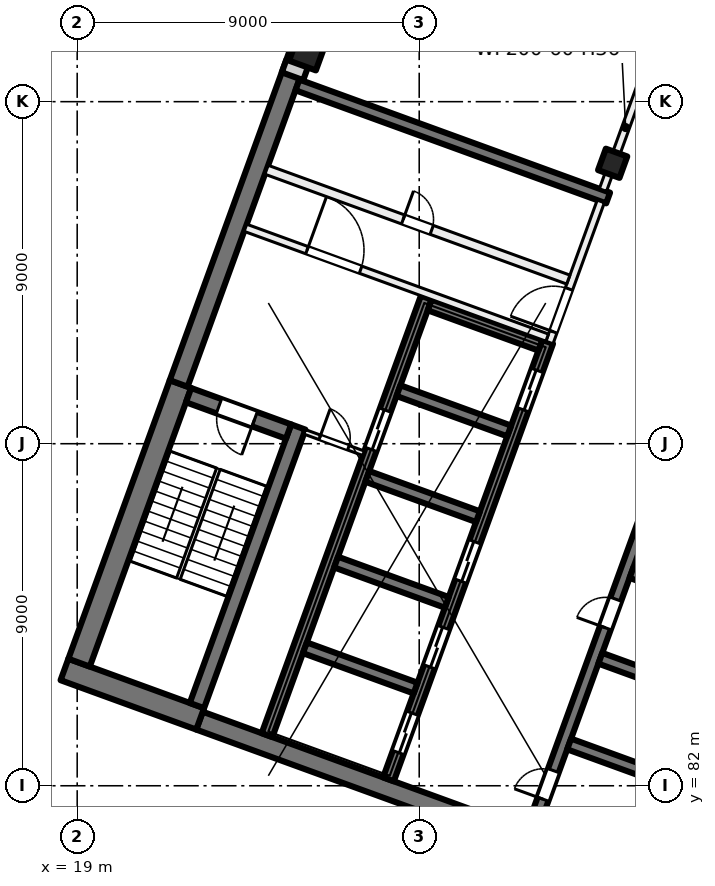
"""IFC4 building model, lengths in metres.
Left out: names, types, materials, properties, quantities, classifications, styles, units other than length and angle.
Written with IfcOpenShell. Run it as: python <this file> out.ifc"""

import sys

from ifc_helpers import new_model, si_unit, direction, frame, frame_2d, origin, origin_2d, place, context, subcontext, project, spatial, rectangle, extrude, element, fill, save


model = new_model("IFC4")
c1 = context("Model", 3, precision=1e-05, world=origin(), true_north=direction((0.0, 1.0)))
c2 = subcontext(c1, "Body", "Model", "MODEL_VIEW")
j1 = project(units=[si_unit("LENGTHUNIT", "METRE"), si_unit("PLANEANGLEUNIT", "RADIAN")], contexts=[c1])
p1 = place(None, origin())
s1 = spatial("IfcSite", under=j1, at=p1, CompositionType="ELEMENT")
p2 = place(p1, origin())
s2 = spatial("IfcBuilding", under=s1, at=p2, CompositionType="ELEMENT")
p3 = place(p2, frame((0.0, 0.0, 212.0)))
s3 = spatial("IfcBuildingStorey", under=s2, at=p3, CompositionType="ELEMENT", Elevation=212.0)
p4 = place(p3, frame((33.091, 98.379, 0.0), z_axis=(0.0, 0.0, 1.0), x_axis=(-0.342020143326, -0.939692620786, 0.0)))
e1 = element("IfcColumn", 1, at=p4, inside=s3, PredefinedType="COLUMN", context=c2, shape_type="SweptSolid", body=[
    extrude(rectangle(XDim=0.6, YDim=0.6, at=origin_2d()), origin(), (0.0, 0.0, 1.0), 4.0),
])
p5 = place(p3, frame((25.056, 101.303, 0.0), z_axis=(0.0, 0.0, 1.0), x_axis=(-0.342020143326, -0.939692620786, 0.0)))
e2 = element("IfcColumn", 2, at=p5, inside=s3, PredefinedType="COLUMN", context=c2, shape_type="SweptSolid", body=[
    extrude(rectangle(XDim=0.75, YDim=0.75, at=origin_2d()), origin(), (0.0, 0.0, 1.0), 4.0),
])
p6 = place(p3, frame((35.75, 78.788, 0.0), z_axis=(0.0, 0.0, 1.0), x_axis=(-0.939692894512, 0.342019391267, 0.0)))
e3 = element("IfcWall", 3, at=p6, inside=s3, PredefinedType="SHEAR", context=c2, shape_type="SweptSolid", body=[
    extrude(rectangle(XDim=14.4, YDim=0.5, at=frame_2d((7.2, 0.0))), origin(), (0.0, 0.0, 1.0), 4.0),
])
p7 = place(p3, frame((22.236, 83.76, 0.0), z_axis=(0.0, 0.0, 1.0), x_axis=(-0.939680822529, 0.342052557032, 0.0)))
e4 = element("IfcWall", 4, at=p7, inside=s3, PredefinedType="SHEAR", context=c2, shape_type="SweptSolid", body=[
    extrude(rectangle(XDim=3.8, YDim=0.6, at=frame_2d((1.9, 0.0))), origin(), (0.0, 0.0, 1.0), 4.0),
])
p8 = place(p3, frame((19.05, 85.239, 0.0), z_axis=(0.0, 0.0, 1.0), x_axis=(0.342016982193, 0.939693771338, 0.0)))
e5 = element("IfcWall", 5, at=p8, inside=s3, PredefinedType="SHEAR", context=c2, shape_type="SweptSolid", body=[
    extrude(rectangle(XDim=7.8, YDim=0.6, at=frame_2d((3.9, 0.0))), origin(), (0.0, 0.0, 1.0), 4.0),
])
p9 = place(p3, frame((21.67, 92.585, 0.0), z_axis=(0.0, 0.0, 1.0), x_axis=(0.342035714298, 0.93968695327, 0.0)))
e6 = element("IfcWall", 6, at=p9, inside=s3, PredefinedType="SHEAR", context=c2, shape_type="SweptSolid", body=[
    extrude(rectangle(XDim=8.975, YDim=0.5, at=frame_2d((4.488, 0.0))), origin(), (0.0, 0.0, 1.0), 4.0),
])
p10 = place(p3, frame((22.15, 84.11, 0.0), z_axis=(0.0, 0.0, 1.0), x_axis=(0.342016982193, 0.939693771338, 0.0)))
e7 = element("IfcWall", 7, at=p10, inside=s3, PredefinedType="SHEAR", context=c2, shape_type="SweptSolid", body=[
    extrude(rectangle(XDim=7.8, YDim=0.4, at=frame_2d((3.9, 0.0))), origin(), (0.0, 0.0, 1.0), 4.0),
])
p11 = place(p3, frame((24.562, 91.32, 0.0), z_axis=(0.0, 0.0, 1.0), x_axis=(-0.939717030584, 0.341953070509, 0.0)))
e8 = element("IfcWall", 8, at=p11, inside=s3, PredefinedType="SHEAR", context=c2, shape_type="SweptSolid", body=[
    extrude(rectangle(XDim=2.8, YDim=0.4, at=frame_2d((1.4, 0.0))), origin(), (0.0, 0.0, 1.0), 4.0),
])
p12 = place(p11, frame((0.95, 0.0, 0.0)))
e9 = element("IfcOpeningElement", 9, at=p12, cuts=e8, PredefinedType="OPENING", context=c2, shape_type="SweptSolid", body=[
    extrude(rectangle(XDim=1.0, YDim=2.1, at=frame_2d((0.5, 1.05))), frame((0.0, 0.21, 0.0), z_axis=(0.0, -1.0, 0.0), x_axis=(1.0, 0.0, 0.0)), (0.0, 0.0, 1.0), 0.42),
])
p13 = place(p3, frame((30.949, 80.801, 0.0), z_axis=(0.0, 0.0, 1.0), x_axis=(0.342016684409, 0.939693879721, 0.0)))
e10 = element("IfcWall", 10, at=p13, inside=s3, PredefinedType="SHEAR", context=c2, shape_type="SweptSolid", body=[
    extrude(rectangle(XDim=12.25, YDim=0.3, at=frame_2d((6.125, 0.0))), origin(), (0.0, 0.0, 1.0), 4.0),
])
p14 = place(p13, frame((0.9, 0.0, 0.0)))
e11 = element("IfcOpeningElement", 11, at=p14, cuts=e10, PredefinedType="OPENING", context=c2, shape_type="SweptSolid", body=[
    extrude(rectangle(XDim=0.8, YDim=2.1, at=frame_2d((0.4, 1.05))), frame((0.0, 0.16, 0.0), z_axis=(0.0, -1.0, 0.0), x_axis=(1.0, 0.0, 0.0)), (0.0, 0.0, 1.0), 0.32),
])
p15 = place(p13, frame((5.7, 0.0, 0.0)))
e12 = element("IfcOpeningElement", 12, at=p15, cuts=e10, PredefinedType="OPENING", context=c2, shape_type="SweptSolid", body=[
    extrude(rectangle(XDim=0.8, YDim=2.1, at=frame_2d((0.4, 1.05))), frame((0.0, 0.16, 0.0), z_axis=(0.0, -1.0, 0.0), x_axis=(1.0, 0.0, 0.0)), (0.0, 0.0, 1.0), 0.32),
])
p16 = place(p3, frame((34.858, 82.039, 0.0), z_axis=(0.0, 0.0, 1.0), x_axis=(-0.939689908313, 0.342027595692, 0.0)))
e13 = element("IfcWall", 13, at=p16, inside=s3, PredefinedType="SHEAR", context=c2, shape_type="SweptSolid", body=[
    extrude(rectangle(XDim=3.1, YDim=0.3, at=frame_2d((1.55, 0.0))), origin(), (0.0, 0.0, 1.0), 4.0),
])
p17 = place(p3, frame((35.679, 84.294, 0.0), z_axis=(0.0, 0.0, 1.0), x_axis=(-0.939706007505, 0.341983361377, 0.0)))
e14 = element("IfcWall", 14, at=p17, inside=s3, PredefinedType="SHEAR", context=c2, shape_type="SweptSolid", body=[
    extrude(rectangle(XDim=3.1, YDim=0.3, at=frame_2d((1.55, 0.0))), origin(), (0.0, 0.0, 1.0), 4.0),
])
p18 = place(p3, frame((36.5, 86.549, 0.0), z_axis=(0.0, 0.0, 1.0), x_axis=(-0.939689908313, 0.342027595692, 0.0)))
e15 = element("IfcWall", 15, at=p18, inside=s3, PredefinedType="SHEAR", context=c2, shape_type="SweptSolid", body=[
    extrude(rectangle(XDim=3.1, YDim=0.3, at=frame_2d((1.55, 0.0))), origin(), (0.0, 0.0, 1.0), 4.0),
])
p19 = place(p3, frame((27.191, 82.169, 0.0), z_axis=(0.0, 0.0, 1.0), x_axis=(0.342016684409, 0.939693879721, 0.0)))
e16 = element("IfcWall", 16, at=p19, inside=s3, PredefinedType="SHEAR", context=c2, shape_type="SweptSolid", body=[
    extrude(rectangle(XDim=12.25, YDim=0.3, at=frame_2d((6.125, 0.0))), origin(), (0.0, 0.0, 1.0), 4.0),
])
p20 = place(p19, frame((0.75, 0.0, 0.0)))
e17 = element("IfcOpeningElement", 17, at=p20, cuts=e16, PredefinedType="OPENING", context=c2, shape_type="SweptSolid", body=[
    extrude(rectangle(XDim=1.1, YDim=2.1, at=frame_2d((0.55, 1.05))), frame((0.0, 0.16, 0.0), z_axis=(0.0, -1.0, 0.0), x_axis=(1.0, 0.0, 0.0)), (0.0, 0.0, 1.0), 0.32),
])
p21 = place(p19, frame((3.15, 0.0, 0.0)))
e18 = element("IfcOpeningElement", 18, at=p21, cuts=e16, PredefinedType="OPENING", context=c2, shape_type="SweptSolid", body=[
    extrude(rectangle(XDim=1.1, YDim=2.1, at=frame_2d((0.55, 1.05))), frame((0.0, 0.16, 0.0), z_axis=(0.0, -1.0, 0.0), x_axis=(1.0, 0.0, 0.0)), (0.0, 0.0, 1.0), 0.32),
])
p22 = place(p19, frame((5.55, 0.0, 0.0)))
e19 = element("IfcOpeningElement", 19, at=p22, cuts=e16, PredefinedType="OPENING", context=c2, shape_type="SweptSolid", body=[
    extrude(rectangle(XDim=1.1, YDim=2.1, at=frame_2d((0.55, 1.05))), frame((0.0, 0.16, 0.0), z_axis=(0.0, -1.0, 0.0), x_axis=(1.0, 0.0, 0.0)), (0.0, 0.0, 1.0), 0.32),
])
p23 = place(p19, frame((10.35, 0.0, 0.0)))
e20 = element("IfcOpeningElement", 20, at=p23, cuts=e16, PredefinedType="OPENING", context=c2, shape_type="SweptSolid", body=[
    extrude(rectangle(XDim=1.1, YDim=2.1, at=frame_2d((0.55, 1.05))), frame((0.0, 0.16, 0.0), z_axis=(0.0, -1.0, 0.0), x_axis=(1.0, 0.0, 0.0)), (0.0, 0.0, 1.0), 0.32),
])
p24 = place(p3, frame((23.996, 83.332, 0.0), z_axis=(0.0, 0.0, 1.0), x_axis=(0.342016684409, 0.939693879721, 0.0)))
e21 = element("IfcWall", 21, at=p24, inside=s3, PredefinedType="SHEAR", context=c2, shape_type="SweptSolid", body=[
    extrude(rectangle(XDim=12.25, YDim=0.3, at=frame_2d((6.125, 0.0))), origin(), (0.0, 0.0, 1.0), 4.0),
])
p25 = place(p24, frame((8.0, 0.0, 0.0)))
e22 = element("IfcOpeningElement", 22, at=p25, cuts=e21, PredefinedType="OPENING", context=c2, shape_type="SweptSolid", body=[
    extrude(rectangle(XDim=1.1, YDim=2.1, at=frame_2d((0.55, 1.05))), frame((0.0, 0.16, 0.0), z_axis=(0.0, -1.0, 0.0), x_axis=(1.0, 0.0, 0.0)), (0.0, 0.0, 1.0), 0.32),
])
for number, where, z_axis, x_axis in (
    (23, (27.905, 84.57, 0.0), (0.0, 0.0, 1.0), (-0.94, 0.342, 0.0)),
    (24, (28.726, 86.825, 0.0), (0.0, 0.0, 1.0), (-0.94, 0.342, 0.0)),
    (25, (29.546, 89.08, 0.0), (0.0, 0.0, 1.0), (-0.94, 0.342, 0.0)),
):
    element("IfcWall", number, at=place(p3, frame(where, z_axis=z_axis, x_axis=x_axis)), inside=s3, PredefinedType="SHEAR", context=c2, shape_type="SweptSolid", body=[
        extrude(rectangle(XDim=3.1, YDim=0.3, at=frame_2d((1.55, 0.0))), origin(), (0.0, 0.0, 1.0), 4.0),
    ])
for number, where, z_axis, x_axis in (
    (26, (30.367, 91.336, 0.0), (0.0, 0.0, 1.0), (-0.94, 0.342, 0.0)),
    (27, (31.188, 93.591, 0.0), (0.0, 0.0, 1.0), (-0.94, 0.342, 0.0)),
):
    element("IfcWall", number, at=place(p3, frame(where, z_axis=z_axis, x_axis=x_axis)), inside=s3, PredefinedType="SHEAR", context=c2, shape_type="SweptSolid", body=[
        extrude(rectangle(XDim=3.1, YDim=0.3, at=frame_2d((1.55, 0.0))), origin(), (0.0, 0.0, 1.0), 4.0),
    ])
p26 = place(p3, frame((32.971, 97.465, 0.0), z_axis=(0.0, 0.0, 1.0), x_axis=(-0.939695066972, 0.34201342241, 0.0)))
e28 = element("IfcWall", 28, at=p26, inside=s3, PredefinedType="SHEAR", context=c2, shape_type="SweptSolid", body=[
    extrude(rectangle(XDim=8.7, YDim=0.3, at=frame_2d((4.35, 0.0))), origin(), (0.0, 0.0, 1.0), 4.0),
])
p27 = place(p3, frame((24.666, 100.669, 0.0), z_axis=(0.0, 0.0, 1.0), x_axis=(0.34201964167, 0.939692803373, 0.0)))
e29 = element("IfcWall", 29, at=p27, inside=s3, PredefinedType="SOLIDWALL", context=c2, shape_type="SweptSolid", body=[
    extrude(rectangle(XDim=32.884, YDim=0.6, at=frame_2d((16.442, 0.0))), origin(), (0.0, 0.0, 1.0), 3.625),
])
p28 = place(p27, frame((1.48, 0.0, 0.9)))
e30 = element("IfcOpeningElement", 30, at=p28, cuts=e29, PredefinedType="OPENING", context=c2, shape_type="SweptSolid", body=[
    extrude(rectangle(XDim=3.0, YDim=2.4, at=frame_2d((1.5, 1.2))), frame((0.0, 0.31, 0.0), z_axis=(0.0, -1.0, 0.0), x_axis=(1.0, 0.0, 0.0)), (0.0, 0.0, 1.0), 0.62),
])
p29 = place(p27, frame((5.98, 0.0, 0.9)))
e31 = element("IfcOpeningElement", 31, at=p29, cuts=e29, PredefinedType="OPENING", context=c2, shape_type="SweptSolid", body=[
    extrude(rectangle(XDim=3.0, YDim=2.4, at=frame_2d((1.5, 1.2))), frame((0.0, 0.31, 0.0), z_axis=(0.0, -1.0, 0.0), x_axis=(1.0, 0.0, 0.0)), (0.0, 0.0, 1.0), 0.62),
])
p30 = place(p27, frame((10.48, 0.0, 0.9)))
e32 = element("IfcOpeningElement", 32, at=p30, cuts=e29, PredefinedType="OPENING", context=c2, shape_type="SweptSolid", body=[
    extrude(rectangle(XDim=3.0, YDim=2.4, at=frame_2d((1.5, 1.2))), frame((0.0, 0.31, 0.0), z_axis=(0.0, -1.0, 0.0), x_axis=(1.0, 0.0, 0.0)), (0.0, 0.0, 1.0), 0.62),
])
p31 = place(p27, frame((14.98, 0.0, 0.9)))
e33 = element("IfcOpeningElement", 33, at=p31, cuts=e29, PredefinedType="OPENING", context=c2, shape_type="SweptSolid", body=[
    extrude(rectangle(XDim=3.0, YDim=2.4, at=frame_2d((1.5, 1.2))), frame((0.0, 0.31, 0.0), z_axis=(0.0, -1.0, 0.0), x_axis=(1.0, 0.0, 0.0)), (0.0, 0.0, 1.0), 0.62),
])
p32 = place(p27, frame((19.48, 0.0, 0.9)))
e34 = element("IfcOpeningElement", 34, at=p32, cuts=e29, PredefinedType="OPENING", context=c2, shape_type="SweptSolid", body=[
    extrude(rectangle(XDim=3.0, YDim=2.4, at=frame_2d((1.5, 1.2))), frame((0.0, 0.31, 0.0), z_axis=(0.0, -1.0, 0.0), x_axis=(1.0, 0.0, 0.0)), (0.0, 0.0, 1.0), 0.62),
])
p33 = place(p27, frame((23.98, 0.0, 0.9)))
e35 = element("IfcOpeningElement", 35, at=p33, cuts=e29, PredefinedType="OPENING", context=c2, shape_type="SweptSolid", body=[
    extrude(rectangle(XDim=3.0, YDim=2.4, at=frame_2d((1.5, 1.2))), frame((0.0, 0.31, 0.0), z_axis=(0.0, -1.0, 0.0), x_axis=(1.0, 0.0, 0.0)), (0.0, 0.0, 1.0), 0.62),
])
p34 = place(p27, frame((28.48, 0.0, 0.9)))
e36 = element("IfcOpeningElement", 36, at=p34, cuts=e29, PredefinedType="OPENING", context=c2, shape_type="SweptSolid", body=[
    extrude(rectangle(XDim=3.0, YDim=2.4, at=frame_2d((1.5, 1.2))), frame((0.0, 0.31, 0.0), z_axis=(0.0, -1.0, 0.0), x_axis=(1.0, 0.0, 0.0)), (0.0, 0.0, 1.0), 0.62),
])
p35 = place(p3, frame((31.427, 93.663, 0.0), z_axis=(0.0, 0.0, 1.0), x_axis=(0.342030870568, 0.93968871632, 0.0)))
e37 = element("IfcWall", 37, at=p35, inside=s3, PredefinedType="PARTITIONING", context=c2, shape_type="SweptSolid", body=[
    extrude(rectangle(XDim=3.95, YDim=0.2, at=frame_2d((1.975, 0.0))), origin(), (0.0, 0.0, 1.0), 3.625),
])
p36 = place(p35, frame((0.3, 0.0, 0.0)))
e38 = element("IfcOpeningElement", 38, at=p36, cuts=e37, PredefinedType="OPENING", context=c2, shape_type="SweptSolid", body=[
    extrude(rectangle(XDim=1.2, YDim=2.1, at=frame_2d((0.6, 1.05))), frame((0.0, 0.11, 0.0), z_axis=(0.0, -1.0, 0.0), x_axis=(1.0, 0.0, 0.0)), (0.0, 0.0, 1.0), 0.22),
])
p37 = place(p3, frame((23.427, 96.682, 0.0), z_axis=(0.0, 0.0, 1.0), x_axis=(0.939690465531, -0.342026064782, 0.0)))
e39 = element("IfcWall", 39, at=p37, inside=s3, PredefinedType="PARTITIONING", context=c2, shape_type="SweptSolid", body=[
    extrude(rectangle(XDim=8.45, YDim=0.2, at=frame_2d((4.225, 0.0))), origin(), (0.0, 0.0, 1.0), 3.625),
])
p38 = place(p37, frame((1.725, 0.0, 0.0)))
e40 = element("IfcOpeningElement", 40, at=p38, cuts=e39, PredefinedType="OPENING", context=c2, shape_type="SweptSolid", body=[
    extrude(rectangle(XDim=1.5, YDim=2.1, at=frame_2d((0.75, 1.05))), frame((0.0, 0.11, 0.0), z_axis=(0.0, -1.0, 0.0), x_axis=(1.0, 0.0, 0.0)), (0.0, 0.0, 1.0), 0.22),
])
p39 = place(p3, frame((23.983, 98.208, 0.0), z_axis=(0.0, 0.0, 1.0), x_axis=(0.939699751196, -0.342000552051, 0.0)))
e41 = element("IfcWall", 41, at=p39, inside=s3, PredefinedType="PARTITIONING", context=c2, shape_type="SweptSolid", body=[
    extrude(rectangle(XDim=8.45, YDim=0.25, at=frame_2d((4.225, 0.0))), origin(), (0.0, 0.0, 1.0), 3.625),
])
p40 = place(p39, frame((3.825, 0.0, 0.0)))
e42 = element("IfcOpeningElement", 42, at=p40, cuts=e41, PredefinedType="OPENING", context=c2, shape_type="SweptSolid", body=[
    extrude(rectangle(XDim=0.8, YDim=2.1, at=frame_2d((0.4, 1.05))), frame((0.0, 0.135, 0.0), z_axis=(0.0, -1.0, 0.0), x_axis=(1.0, 0.0, 0.0)), (0.0, 0.0, 1.0), 0.27),
])
p41 = place(p3, frame((24.985, 91.312, 0.0), z_axis=(0.0, 0.0, 1.0), x_axis=(0.939719959755, -0.341945020783, 0.0)))
e43 = element("IfcWall", 43, at=p41, inside=s3, PredefinedType="PARTITIONING", context=c2, shape_type="SweptSolid", body=[
    extrude(rectangle(XDim=1.65, YDim=0.125, at=frame_2d((0.825, 0.0))), origin(), (0.0, 0.0, 1.0), 3.625),
])
p42 = place(p41, frame((0.425, 0.0, 0.0)))
e44 = element("IfcOpeningElement", 44, at=p42, cuts=e43, PredefinedType="OPENING", context=c2, shape_type="SweptSolid", body=[
    extrude(rectangle(XDim=0.8, YDim=2.1, at=frame_2d((0.4, 1.05))), frame((0.0, 0.073, 0.0), z_axis=(0.0, -1.0, 0.0), x_axis=(1.0, 0.0, 0.0)), (0.0, 0.0, 1.0), 0.145),
])
p43 = place(p3, frame((26.737, 105.481, 0.0), z_axis=(0.0, 0.0, 1.0), x_axis=(0.939664418128, -0.342097619554, 0.0)))
e45 = element("IfcWall", 45, at=p43, inside=s3, PredefinedType="PARTITIONING", context=c2, shape_type="SweptSolid", body=[
    extrude(rectangle(XDim=18.299, YDim=0.15, at=frame_2d((9.149, 0.0))), origin(), (0.0, 0.0, 1.0), 3.625),
])
p44 = place(p3, frame((32.834, 97.674, 0.0), z_axis=(0.0, 0.0, 1.0), x_axis=(0.342017493073, 0.939693585395, 0.0)))
e46 = element("IfcWall", 46, at=p44, inside=s3, PredefinedType="PARTITIONING", context=c2, shape_type="SweptSolid", body=[
    extrude(rectangle(XDim=3.5, YDim=0.2, at=frame_2d((1.75, 0.0))), origin(), (0.0, 0.0, 1.0), 3.625),
])
p45 = place(p20, origin())
e47 = element("IfcDoor", 47, at=p45, inside=s3, OperationType="DOUBLE_DOOR_SLIDING", PredefinedType="DOOR", context=c2, shape_type="SweptSolid", body=[
    extrude(rectangle(XDim=1.1, YDim=2.1, at=frame_2d((0.55, 1.05))), frame((0.0, 0.025, 0.0), z_axis=(0.0, -1.0, 0.0), x_axis=(1.0, 0.0, 0.0)), (0.0, 0.0, 1.0), 0.05),
])
fill(e17, e47)
p46 = place(p21, origin())
e48 = element("IfcDoor", 48, at=p46, inside=s3, OperationType="DOUBLE_DOOR_SLIDING", PredefinedType="DOOR", context=c2, shape_type="SweptSolid", body=[
    extrude(rectangle(XDim=1.1, YDim=2.1, at=frame_2d((0.55, 1.05))), frame((0.0, 0.025, 0.0), z_axis=(0.0, -1.0, 0.0), x_axis=(1.0, 0.0, 0.0)), (0.0, 0.0, 1.0), 0.05),
])
fill(e18, e48)
p47 = place(p22, origin())
e49 = element("IfcDoor", 49, at=p47, inside=s3, OperationType="DOUBLE_DOOR_SLIDING", PredefinedType="DOOR", context=c2, shape_type="SweptSolid", body=[
    extrude(rectangle(XDim=1.1, YDim=2.1, at=frame_2d((0.55, 1.05))), frame((0.0, 0.025, 0.0), z_axis=(0.0, -1.0, 0.0), x_axis=(1.0, 0.0, 0.0)), (0.0, 0.0, 1.0), 0.05),
])
fill(e19, e49)
p48 = place(p23, origin())
e50 = element("IfcDoor", 50, at=p48, inside=s3, OperationType="DOUBLE_DOOR_SLIDING", PredefinedType="DOOR", context=c2, shape_type="SweptSolid", body=[
    extrude(rectangle(XDim=1.1, YDim=2.1, at=frame_2d((0.55, 1.05))), frame((0.0, 0.025, 0.0), z_axis=(0.0, -1.0, 0.0), x_axis=(1.0, 0.0, 0.0)), (0.0, 0.0, 1.0), 0.05),
])
fill(e20, e50)
p49 = place(p14, origin())
e51 = element("IfcDoor", 51, at=p49, inside=s3, OperationType="SINGLE_SWING_LEFT", PredefinedType="DOOR", context=c2, shape_type="SweptSolid", body=[
    extrude(rectangle(XDim=0.8, YDim=2.1, at=frame_2d((0.4, 1.05))), frame((0.0, 0.025, 0.0), z_axis=(0.0, -1.0, 0.0), x_axis=(1.0, 0.0, 0.0)), (0.0, 0.0, 1.0), 0.05),
])
fill(e11, e51)
p50 = place(p15, origin())
e52 = element("IfcDoor", 52, at=p50, inside=s3, OperationType="SINGLE_SWING_RIGHT", PredefinedType="DOOR", context=c2, shape_type="SweptSolid", body=[
    extrude(rectangle(XDim=0.8, YDim=2.1, at=frame_2d((0.4, 1.05))), frame((0.0, 0.025, 0.0), z_axis=(0.0, -1.0, 0.0), x_axis=(1.0, 0.0, 0.0)), (0.0, 0.0, 1.0), 0.05),
])
fill(e12, e52)
p51 = place(p36, origin())
e53 = element("IfcDoor", 53, at=p51, inside=s3, OperationType="DOUBLE_DOOR_SINGLE_SWING", PredefinedType="DOOR", context=c2, shape_type="SweptSolid", body=[
    extrude(rectangle(XDim=1.2, YDim=2.1, at=frame_2d((0.6, 1.05))), frame((0.0, 0.025, 0.0), z_axis=(0.0, -1.0, 0.0), x_axis=(1.0, 0.0, 0.0)), (0.0, 0.0, 1.0), 0.05),
])
fill(e38, e53)
p52 = place(p38, origin())
e54 = element("IfcDoor", 54, at=p52, inside=s3, OperationType="DOUBLE_DOOR_SINGLE_SWING", PredefinedType="DOOR", context=c2, shape_type="SweptSolid", body=[
    extrude(rectangle(XDim=1.5, YDim=2.1, at=frame_2d((0.75, 1.05))), frame((0.0, 0.025, 0.0), z_axis=(0.0, -1.0, 0.0), x_axis=(1.0, 0.0, 0.0)), (0.0, 0.0, 1.0), 0.05),
])
fill(e40, e54)
p53 = place(p12, origin())
e55 = element("IfcDoor", 55, at=p53, inside=s3, OperationType="SINGLE_SWING_LEFT", PredefinedType="DOOR", context=c2, shape_type="SweptSolid", body=[
    extrude(rectangle(XDim=1.0, YDim=2.1, at=frame_2d((0.5, 1.05))), frame((0.0, 0.025, 0.0), z_axis=(0.0, -1.0, 0.0), x_axis=(1.0, 0.0, 0.0)), (0.0, 0.0, 1.0), 0.05),
])
fill(e9, e55)
p54 = place(p42, origin())
e56 = element("IfcDoor", 56, at=p54, inside=s3, OperationType="SINGLE_SWING_RIGHT", PredefinedType="DOOR", context=c2, shape_type="SweptSolid", body=[
    extrude(rectangle(XDim=0.8, YDim=2.1, at=frame_2d((0.4, 1.05))), frame((0.0, 0.025, 0.0), z_axis=(0.0, -1.0, 0.0), x_axis=(1.0, 0.0, 0.0)), (0.0, 0.0, 1.0), 0.05),
])
fill(e44, e56)
p55 = place(p40, origin())
e57 = element("IfcDoor", 57, at=p55, inside=s3, OperationType="SINGLE_SWING_LEFT", PredefinedType="DOOR", context=c2, shape_type="SweptSolid", body=[
    extrude(rectangle(XDim=0.8, YDim=2.1, at=frame_2d((0.4, 1.05))), frame((0.0, 0.025, 0.0), z_axis=(0.0, -1.0, 0.0), x_axis=(1.0, 0.0, 0.0)), (0.0, 0.0, 1.0), 0.05),
])
fill(e42, e57)
p56 = place(p25, origin())
e58 = element("IfcDoor", 58, at=p56, inside=s3, OperationType="DOUBLE_DOOR_SLIDING", PredefinedType="DOOR", context=c2, shape_type="SweptSolid", body=[
    extrude(rectangle(XDim=1.1, YDim=2.1, at=frame_2d((0.55, 1.05))), frame((0.0, 0.025, 0.0), z_axis=(0.0, -1.0, 0.0), x_axis=(1.0, 0.0, 0.0)), (0.0, 0.0, 1.0), 0.05),
])
fill(e22, e58)
save(model, sys.argv[1])
